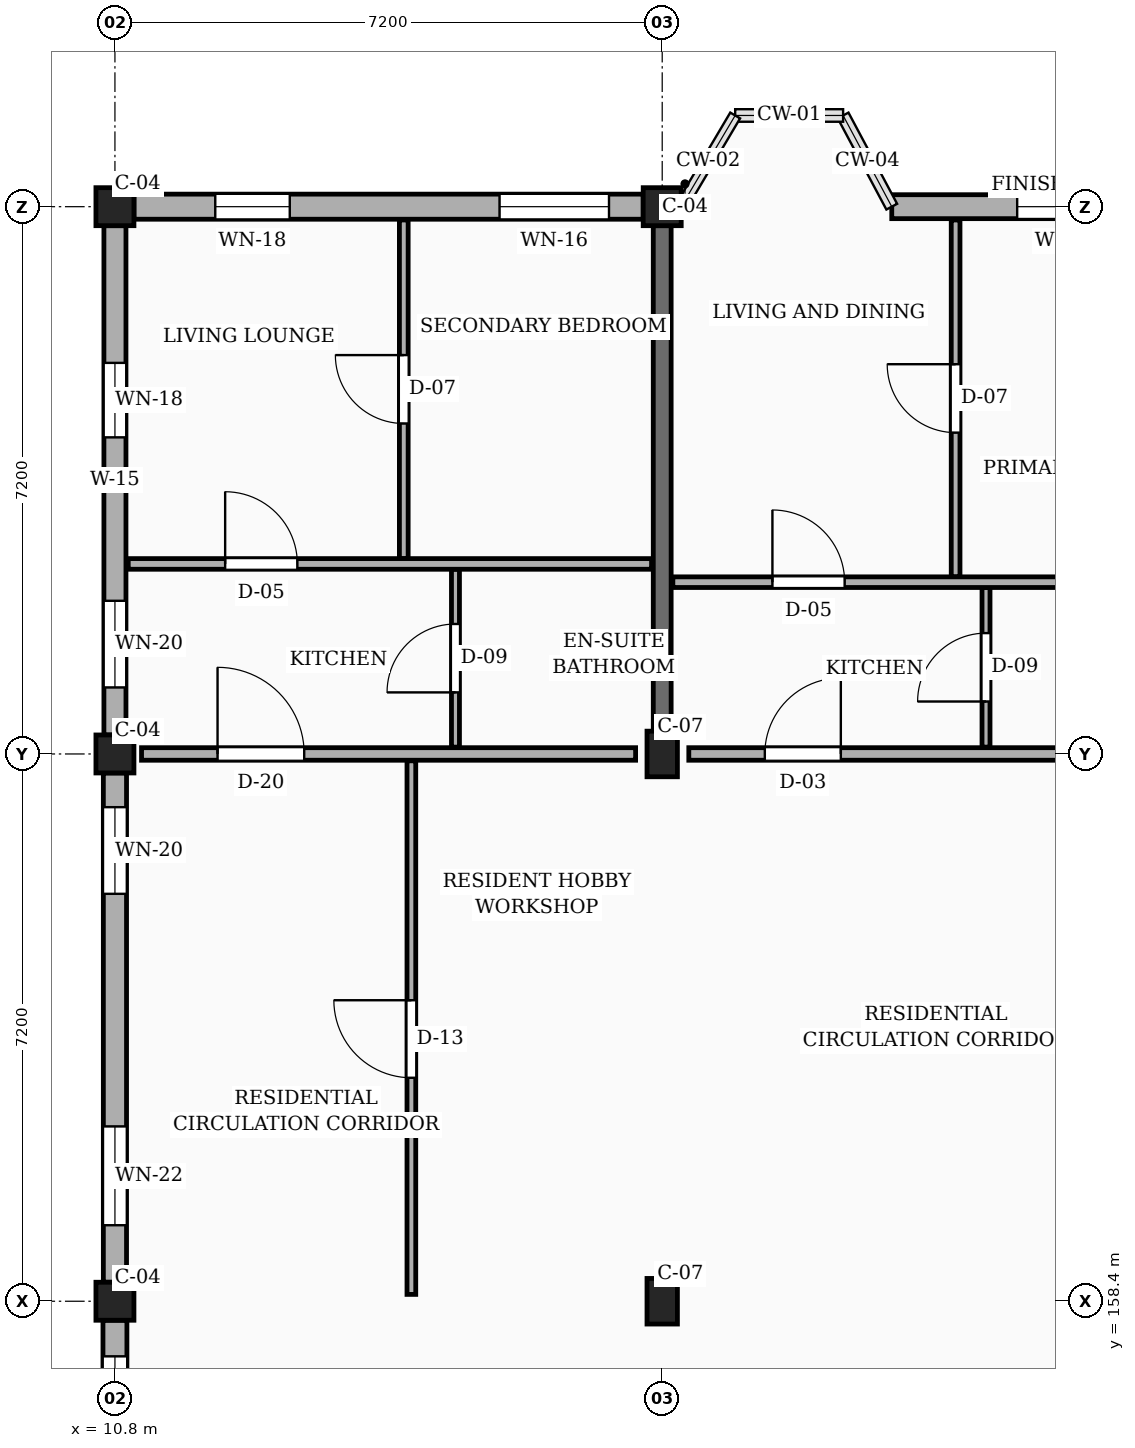
"""IFC4 building model, lengths in metres.
Left out: names, types, materials, properties, quantities, classifications, styles, units other than length and angle.
Written with IfcOpenShell. Run it as: python <this file> out.ifc"""

import sys

from ifc_helpers import new_model, si_unit, direction, frame, frame_2d, origin, origin_2d, place, context, subcontext, project, spatial, rectangle, extrude, element, fill, save


model = new_model("IFC4")
c1 = context("Model", 3, precision=1e-05, world=origin(), true_north=direction((0.0, 1.0)))
c2 = subcontext(c1, "Body", "Model", "MODEL_VIEW")
j1 = project(units=[si_unit("LENGTHUNIT", "METRE"), si_unit("PLANEANGLEUNIT", "RADIAN")], contexts=[c1])
p1 = place(None, origin())
s1 = spatial("IfcSite", under=j1, at=p1, CompositionType="ELEMENT")
p2 = place(p1, origin())
s2 = spatial("IfcBuilding", under=s1, at=p2, CompositionType="ELEMENT")
p3 = place(p2, frame((0.0, 0.0, 23.4)))
s3 = spatial("IfcBuildingStorey", under=s2, at=p3, CompositionType="ELEMENT", Elevation=23.4)
for number, where, z_axis, x_axis in (
    (1, (10.8, 158.4, 0.0), (0.0, 0.0, 1.0), (1.0, 0.0, 0.0)),
    (2, (10.8, 165.6, 0.0), (0.0, 0.0, 1.0), (1.0, 0.0, 0.0)),
    (3, (10.8, 172.8, 0.0), (0.0, 0.0, 1.0), (1.0, 0.0, 0.0)),
):
    element("IfcColumn", number, at=place(p3, frame(where, z_axis=z_axis, x_axis=x_axis)), inside=s3, PredefinedType="COLUMN", context=c2, shape_type="SweptSolid", body=[
        extrude(rectangle(XDim=0.5, YDim=0.5, at=origin_2d()), origin(), (0.0, 0.0, 1.0), 3.15),
    ])
for number, where, z_axis, x_axis in (
    (4, (18.0, 158.4, 0.0), (0.0, 0.0, 1.0), (1.0, 0.0, 0.0)),
    (5, (18.0, 165.6, 0.0), (0.0, 0.0, 1.0), (1.0, 0.0, 0.0)),
):
    element("IfcColumn", number, at=place(p3, frame(where, z_axis=z_axis, x_axis=x_axis)), inside=s3, PredefinedType="COLUMN", context=c2, shape_type="SweptSolid", body=[
        extrude(rectangle(XDim=0.4, YDim=0.6, at=origin_2d()), origin(), (0.0, 0.0, 1.0), 3.15),
    ])
p4 = place(p3, frame((18.0, 172.8, 0.0), z_axis=(0.0, 0.0, 1.0), x_axis=(1.0, 0.0, 0.0)))
e6 = element("IfcColumn", 6, at=p4, inside=s3, PredefinedType="COLUMN", context=c2, shape_type="SweptSolid", body=[
    extrude(rectangle(XDim=0.5, YDim=0.5, at=origin_2d()), origin(), (0.0, 0.0, 1.0), 3.15),
])
p5 = place(p3, frame((18.0, 165.9, 0.0), z_axis=(0.0, 0.0, 1.0), x_axis=(0.0, 1.0, 0.0)))
e7 = element("IfcWall", 7, at=p5, inside=s3, PredefinedType="SOLIDWALL", context=c2, shape_type="SweptSolid", body=[
    extrude(rectangle(XDim=6.65, YDim=0.235, at=frame_2d((3.325, 0.0))), origin(), (0.0, 0.0, 1.0), 2.185),
])
p6 = place(p3, frame((24.95, 172.8, 0.0), z_axis=(0.0, 0.0, 1.0), x_axis=(-1.0, 0.0, 0.0)))
e8 = element("IfcWall", 8, at=p6, inside=s3, PredefinedType="SOLIDWALL", context=c2, shape_type="SweptSolid", body=[
    extrude(rectangle(XDim=3.93, YDim=0.315, at=frame_2d((1.965, 0.0))), origin(), (0.0, 0.0, 1.0), 2.455),
])
p7 = place(p6, frame((0.92, 0.0, 0.78)))
e9 = element("IfcOpeningElement", 9, at=p7, cuts=e8, PredefinedType="OPENING", context=c2, shape_type="SweptSolid", body=[
    extrude(rectangle(XDim=1.36, YDim=1.26, at=frame_2d((0.68, 0.63))), frame((0.0, 0.167, 0.0), z_axis=(0.0, -1.0, 0.0), x_axis=(1.0, 0.0, 0.0)), (0.0, 0.0, 1.0), 0.335),
])
p8 = place(p3, frame((17.75, 172.8, 0.0), z_axis=(0.0, 0.0, 1.0), x_axis=(-1.0, 0.0, 0.0)))
e10 = element("IfcWall", 10, at=p8, inside=s3, PredefinedType="SOLIDWALL", context=c2, shape_type="SweptSolid", body=[
    extrude(rectangle(XDim=6.7, YDim=0.33, at=frame_2d((3.35, 0.0))), origin(), (0.0, 0.0, 1.0), 2.455),
])
p9 = place(p8, frame((0.45, 0.0, 0.78)))
e11 = element("IfcOpeningElement", 11, at=p9, cuts=e10, PredefinedType="OPENING", context=c2, shape_type="SweptSolid", body=[
    extrude(rectangle(XDim=1.44, YDim=1.26, at=frame_2d((0.72, 0.63))), frame((0.0, 0.175, 0.0), z_axis=(0.0, -1.0, 0.0), x_axis=(1.0, 0.0, 0.0)), (0.0, 0.0, 1.0), 0.35),
])
p10 = place(p8, frame((4.65, 0.0, 0.78)))
e12 = element("IfcOpeningElement", 12, at=p10, cuts=e10, PredefinedType="OPENING", context=c2, shape_type="SweptSolid", body=[
    extrude(rectangle(XDim=0.98, YDim=1.36, at=frame_2d((0.49, 0.68))), frame((0.0, 0.175, 0.0), z_axis=(0.0, -1.0, 0.0), x_axis=(1.0, 0.0, 0.0)), (0.0, 0.0, 1.0), 0.35),
])
p11 = place(p3, frame((10.8, 172.55, 0.0), z_axis=(0.0, 0.0, 1.0), x_axis=(0.0, -1.0, 0.0)))
e13 = element("IfcWall", 13, at=p11, inside=s3, PredefinedType="SOLIDWALL", context=c2, shape_type="SweptSolid", body=[
    extrude(rectangle(XDim=6.7, YDim=0.29, at=frame_2d((3.35, 0.0))), origin(), (0.0, 0.0, 1.0), 2.455),
])
p12 = place(p11, frame((1.805, 0.0, 0.78)))
e14 = element("IfcOpeningElement", 14, at=p12, cuts=e13, PredefinedType="OPENING", context=c2, shape_type="SweptSolid", body=[
    extrude(rectangle(XDim=0.98, YDim=1.36, at=frame_2d((0.49, 0.68))), frame((0.0, 0.155, 0.0), z_axis=(0.0, -1.0, 0.0), x_axis=(1.0, 0.0, 0.0)), (0.0, 0.0, 1.0), 0.31),
])
p13 = place(p11, frame((4.935, 0.0, 0.78)))
e15 = element("IfcOpeningElement", 15, at=p13, cuts=e13, PredefinedType="OPENING", context=c2, shape_type="SweptSolid", body=[
    extrude(rectangle(XDim=1.14, YDim=1.36, at=frame_2d((0.57, 0.68))), frame((0.0, 0.155, 0.0), z_axis=(0.0, -1.0, 0.0), x_axis=(1.0, 0.0, 0.0)), (0.0, 0.0, 1.0), 0.31),
])
p14 = place(p3, frame((10.8, 165.35, 0.0), z_axis=(0.0, 0.0, 1.0), x_axis=(0.0, -1.0, 0.0)))
e16 = element("IfcWall", 16, at=p14, inside=s3, PredefinedType="SOLIDWALL", context=c2, shape_type="SweptSolid", body=[
    extrude(rectangle(XDim=6.7, YDim=0.305, at=frame_2d((3.35, 0.0))), origin(), (0.0, 0.0, 1.0), 2.455),
])
p15 = place(p14, frame((0.45, 0.0, 0.78)))
e17 = element("IfcOpeningElement", 17, at=p15, cuts=e16, PredefinedType="OPENING", context=c2, shape_type="SweptSolid", body=[
    extrude(rectangle(XDim=1.14, YDim=1.36, at=frame_2d((0.57, 0.68))), frame((0.0, 0.163, 0.0), z_axis=(0.0, -1.0, 0.0), x_axis=(1.0, 0.0, 0.0)), (0.0, 0.0, 1.0), 0.325),
])
p16 = place(p14, frame((4.65, 0.0, 0.78)))
e18 = element("IfcOpeningElement", 18, at=p16, cuts=e16, PredefinedType="OPENING", context=c2, shape_type="SweptSolid", body=[
    extrude(rectangle(XDim=1.3, YDim=1.36, at=frame_2d((0.65, 0.68))), frame((0.0, 0.163, 0.0), z_axis=(0.0, -1.0, 0.0), x_axis=(1.0, 0.0, 0.0)), (0.0, 0.0, 1.0), 0.325),
])
p17 = place(p3, frame((10.8, 158.15, 0.0), z_axis=(0.0, 0.0, 1.0), x_axis=(0.0, -1.0, 0.0)))
e19 = element("IfcWall", 19, at=p17, inside=s3, PredefinedType="SOLIDWALL", context=c2, shape_type="SweptSolid", body=[
    extrude(rectangle(XDim=6.7, YDim=0.315, at=frame_2d((3.35, 0.0))), origin(), (0.0, 0.0, 1.0), 2.455),
])
p18 = place(p17, frame((0.475, 0.0, 0.78)))
e20 = element("IfcOpeningElement", 20, at=p18, cuts=e19, PredefinedType="OPENING", context=c2, shape_type="SweptSolid", body=[
    extrude(rectangle(XDim=1.04, YDim=1.26, at=frame_2d((0.52, 0.63))), frame((0.0, 0.167, 0.0), z_axis=(0.0, -1.0, 0.0), x_axis=(1.0, 0.0, 0.0)), (0.0, 0.0, 1.0), 0.335),
])
p19 = place(p17, frame((3.27, 0.0, 0.78)))
e21 = element("IfcOpeningElement", 21, at=p19, cuts=e19, PredefinedType="OPENING", context=c2, shape_type="SweptSolid", body=[
    extrude(rectangle(XDim=1.46, YDim=1.36, at=frame_2d((0.73, 0.68))), frame((0.0, 0.167, 0.0), z_axis=(0.0, -1.0, 0.0), x_axis=(1.0, 0.0, 0.0)), (0.0, 0.0, 1.0), 0.335),
])
p20 = place(p3, frame((11.15, 165.6, 0.0), z_axis=(0.0, 0.0, 1.0), x_axis=(1.0, 0.0, 0.0)))
e22 = element("IfcWall", 22, at=p20, inside=s3, PredefinedType="PARTITIONING", context=c2, shape_type="SweptSolid", body=[
    extrude(rectangle(XDim=6.5, YDim=0.165, at=frame_2d((3.25, 0.0))), origin(), (0.0, 0.0, 1.0), 2.32),
])
p21 = place(p20, frame((1.0, 0.0, 0.0)))
e23 = element("IfcOpeningElement", 23, at=p21, cuts=e22, PredefinedType="OPENING", context=c2, shape_type="SweptSolid", body=[
    extrude(rectangle(XDim=1.14, YDim=2.18, at=frame_2d((0.57, 1.09))), frame((0.0, 0.093, 0.0), z_axis=(0.0, -1.0, 0.0), x_axis=(1.0, 0.0, 0.0)), (0.0, 0.0, 1.0), 0.185),
])
p22 = place(p3, frame((18.35, 165.6, 0.0), z_axis=(0.0, 0.0, 1.0), x_axis=(1.0, 0.0, 0.0)))
e24 = element("IfcWall", 24, at=p22, inside=s3, PredefinedType="PARTITIONING", context=c2, shape_type="SweptSolid", body=[
    extrude(rectangle(XDim=6.5, YDim=0.165, at=frame_2d((3.25, 0.0))), origin(), (0.0, 0.0, 1.0), 2.32),
])
p23 = place(p22, frame((1.0, 0.0, 0.0)))
e25 = element("IfcOpeningElement", 25, at=p23, cuts=e24, PredefinedType="OPENING", context=c2, shape_type="SweptSolid", body=[
    extrude(rectangle(XDim=1.0, YDim=2.15, at=frame_2d((0.5, 1.075))), frame((0.0, 0.093, 0.0), z_axis=(0.0, -1.0, 0.0), x_axis=(1.0, 0.0, 0.0)), (0.0, 0.0, 1.0), 0.185),
])
p24 = place(p3, frame((14.7, 158.49, 0.0), z_axis=(0.0, 0.0, 1.0), x_axis=(0.0, 1.0, 0.0)))
e26 = element("IfcWall", 26, at=p24, inside=s3, PredefinedType="PARTITIONING", context=c2, shape_type="SweptSolid", body=[
    extrude(rectangle(XDim=7.02, YDim=0.115, at=frame_2d((3.51, 0.0))), origin(), (0.0, 0.0, 1.0), 2.32),
])
p25 = place(p24, frame((2.85, 0.0, 0.0)))
e27 = element("IfcOpeningElement", 27, at=p25, cuts=e26, PredefinedType="OPENING", context=c2, shape_type="SweptSolid", body=[
    extrude(rectangle(XDim=1.02, YDim=2.15, at=frame_2d((0.51, 1.075))), frame((0.0, 0.067, 0.0), z_axis=(0.0, -1.0, 0.0), x_axis=(1.0, 0.0, 0.0)), (0.0, 0.0, 1.0), 0.135),
])
p26 = place(p3, frame((14.6, 168.17, 0.0), z_axis=(0.0, 0.0, 1.0), x_axis=(0.0, 1.0, 0.0)))
e28 = element("IfcWall", 28, at=p26, inside=s3, PredefinedType="PARTITIONING", context=c2, shape_type="SweptSolid", body=[
    extrude(rectangle(XDim=4.455, YDim=0.115, at=frame_2d((2.228, 0.0))), origin(), (0.0, 0.0, 1.0), 2.32),
])
p27 = place(p26, frame((1.778, 0.0, 0.0)))
e29 = element("IfcOpeningElement", 29, at=p27, cuts=e28, PredefinedType="OPENING", context=c2, shape_type="SweptSolid", body=[
    extrude(rectangle(XDim=0.9, YDim=2.1, at=frame_2d((0.45, 1.05))), frame((0.0, 0.067, 0.0), z_axis=(0.0, -1.0, 0.0), x_axis=(1.0, 0.0, 0.0)), (0.0, 0.0, 1.0), 0.135),
])
p28 = place(p3, frame((15.28, 165.69, 0.0), z_axis=(0.0, 0.0, 1.0), x_axis=(0.0, 1.0, 0.0)))
e30 = element("IfcWall", 30, at=p28, inside=s3, PredefinedType="PARTITIONING", context=c2, shape_type="SweptSolid", body=[
    extrude(rectangle(XDim=2.34, YDim=0.105, at=frame_2d((1.17, 0.0))), origin(), (0.0, 0.0, 1.0), 2.32),
])
p29 = place(p28, frame((0.72, 0.0, 0.0)))
e31 = element("IfcOpeningElement", 31, at=p29, cuts=e30, PredefinedType="OPENING", context=c2, shape_type="SweptSolid", body=[
    extrude(rectangle(XDim=0.9, YDim=2.05, at=frame_2d((0.45, 1.025))), frame((0.0, 0.062, 0.0), z_axis=(0.0, -1.0, 0.0), x_axis=(1.0, 0.0, 0.0)), (0.0, 0.0, 1.0), 0.125),
])
p30 = place(p3, frame((10.975, 168.1, 0.0), z_axis=(0.0, 0.0, 1.0), x_axis=(1.0, 0.0, 0.0)))
e32 = element("IfcWall", 32, at=p30, inside=s3, PredefinedType="PARTITIONING", context=c2, shape_type="SweptSolid", body=[
    extrude(rectangle(XDim=6.885, YDim=0.14, at=frame_2d((3.442, 0.0))), origin(), (0.0, 0.0, 1.0), 2.32),
])
p31 = place(p30, frame((1.275, 0.0, 0.0)))
e33 = element("IfcOpeningElement", 33, at=p31, cuts=e32, PredefinedType="OPENING", context=c2, shape_type="SweptSolid", body=[
    extrude(rectangle(XDim=0.95, YDim=2.1, at=frame_2d((0.475, 1.05))), frame((0.0, 0.08, 0.0), z_axis=(0.0, -1.0, 0.0), x_axis=(1.0, 0.0, 0.0)), (0.0, 0.0, 1.0), 0.16),
])
p32 = place(p3, frame((21.86, 167.93, 0.0), z_axis=(0.0, 0.0, 1.0), x_axis=(0.0, 1.0, 0.0)))
e34 = element("IfcWall", 34, at=p32, inside=s3, PredefinedType="PARTITIONING", context=c2, shape_type="SweptSolid", body=[
    extrude(rectangle(XDim=4.695, YDim=0.115, at=frame_2d((2.348, 0.0))), origin(), (0.0, 0.0, 1.0), 2.32),
])
p33 = place(p32, frame((1.897, 0.0, 0.0)))
e35 = element("IfcOpeningElement", 35, at=p33, cuts=e34, PredefinedType="OPENING", context=c2, shape_type="SweptSolid", body=[
    extrude(rectangle(XDim=0.9, YDim=2.1, at=frame_2d((0.45, 1.05))), frame((0.0, 0.067, 0.0), z_axis=(0.0, -1.0, 0.0), x_axis=(1.0, 0.0, 0.0)), (0.0, 0.0, 1.0), 0.135),
])
p34 = place(p3, frame((22.26, 165.69, 0.0), z_axis=(0.0, 0.0, 1.0), x_axis=(0.0, 1.0, 0.0)))
e36 = element("IfcWall", 36, at=p34, inside=s3, PredefinedType="PARTITIONING", context=c2, shape_type="SweptSolid", body=[
    extrude(rectangle(XDim=2.1, YDim=0.105, at=frame_2d((1.05, 0.0))), origin(), (0.0, 0.0, 1.0), 2.32),
])
p35 = place(p34, frame((0.6, 0.0, 0.0)))
e37 = element("IfcOpeningElement", 37, at=p35, cuts=e36, PredefinedType="OPENING", context=c2, shape_type="SweptSolid", body=[
    extrude(rectangle(XDim=0.9, YDim=2.05, at=frame_2d((0.45, 1.025))), frame((0.0, 0.062, 0.0), z_axis=(0.0, -1.0, 0.0), x_axis=(1.0, 0.0, 0.0)), (0.0, 0.0, 1.0), 0.125),
])
p36 = place(p3, frame((18.14, 167.86, 0.0), z_axis=(0.0, 0.0, 1.0), x_axis=(1.0, 0.0, 0.0)))
e38 = element("IfcWall", 38, at=p36, inside=s3, PredefinedType="PARTITIONING", context=c2, shape_type="SweptSolid", body=[
    extrude(rectangle(XDim=6.92, YDim=0.14, at=frame_2d((3.46, 0.0))), origin(), (0.0, 0.0, 1.0), 2.32),
])
p37 = place(p36, frame((1.31, 0.0, 0.0)))
e39 = element("IfcOpeningElement", 39, at=p37, cuts=e38, PredefinedType="OPENING", context=c2, shape_type="SweptSolid", body=[
    extrude(rectangle(XDim=0.95, YDim=2.1, at=frame_2d((0.475, 1.05))), frame((0.0, 0.08, 0.0), z_axis=(0.0, -1.0, 0.0), x_axis=(1.0, 0.0, 0.0)), (0.0, 0.0, 1.0), 0.16),
])
p38 = place(p7, origin())
e40 = element("IfcWindow", 40, at=p38, inside=s3, PartitioningType="SINGLE_PANEL", PredefinedType="WINDOW", context=c2, shape_type="SweptSolid", body=[
    extrude(rectangle(XDim=1.36, YDim=1.26, at=frame_2d((0.68, 0.63))), frame((0.0, 0.03, 0.0), z_axis=(0.0, -1.0, 0.0), x_axis=(1.0, 0.0, 0.0)), (0.0, 0.0, 1.0), 0.06),
])
fill(e9, e40)
p39 = place(p9, origin())
e41 = element("IfcWindow", 41, at=p39, inside=s3, PartitioningType="SINGLE_PANEL", PredefinedType="WINDOW", context=c2, shape_type="SweptSolid", body=[
    extrude(rectangle(XDim=1.44, YDim=1.26, at=frame_2d((0.72, 0.63))), frame((0.0, 0.03, 0.0), z_axis=(0.0, -1.0, 0.0), x_axis=(1.0, 0.0, 0.0)), (0.0, 0.0, 1.0), 0.06),
])
fill(e11, e41)
p40 = place(p10, origin())
e42 = element("IfcWindow", 42, at=p40, inside=s3, PartitioningType="SINGLE_PANEL", PredefinedType="WINDOW", context=c2, shape_type="SweptSolid", body=[
    extrude(rectangle(XDim=0.98, YDim=1.36, at=frame_2d((0.49, 0.68))), frame((0.0, 0.03, 0.0), z_axis=(0.0, -1.0, 0.0), x_axis=(1.0, 0.0, 0.0)), (0.0, 0.0, 1.0), 0.06),
])
fill(e12, e42)
p41 = place(p12, origin())
e43 = element("IfcWindow", 43, at=p41, inside=s3, PartitioningType="SINGLE_PANEL", PredefinedType="WINDOW", context=c2, shape_type="SweptSolid", body=[
    extrude(rectangle(XDim=0.98, YDim=1.36, at=frame_2d((0.49, 0.68))), frame((0.0, 0.03, 0.0), z_axis=(0.0, -1.0, 0.0), x_axis=(1.0, 0.0, 0.0)), (0.0, 0.0, 1.0), 0.06),
])
fill(e14, e43)
p42 = place(p13, origin())
e44 = element("IfcWindow", 44, at=p42, inside=s3, PartitioningType="SINGLE_PANEL", PredefinedType="WINDOW", context=c2, shape_type="SweptSolid", body=[
    extrude(rectangle(XDim=1.14, YDim=1.36, at=frame_2d((0.57, 0.68))), frame((0.0, 0.03, 0.0), z_axis=(0.0, -1.0, 0.0), x_axis=(1.0, 0.0, 0.0)), (0.0, 0.0, 1.0), 0.06),
])
fill(e15, e44)
p43 = place(p15, origin())
e45 = element("IfcWindow", 45, at=p43, inside=s3, PartitioningType="SINGLE_PANEL", PredefinedType="WINDOW", context=c2, shape_type="SweptSolid", body=[
    extrude(rectangle(XDim=1.14, YDim=1.36, at=frame_2d((0.57, 0.68))), frame((0.0, 0.03, 0.0), z_axis=(0.0, -1.0, 0.0), x_axis=(1.0, 0.0, 0.0)), (0.0, 0.0, 1.0), 0.06),
])
fill(e17, e45)
p44 = place(p16, origin())
e46 = element("IfcWindow", 46, at=p44, inside=s3, PartitioningType="SINGLE_PANEL", PredefinedType="WINDOW", context=c2, shape_type="SweptSolid", body=[
    extrude(rectangle(XDim=1.3, YDim=1.36, at=frame_2d((0.65, 0.68))), frame((0.0, 0.03, 0.0), z_axis=(0.0, -1.0, 0.0), x_axis=(1.0, 0.0, 0.0)), (0.0, 0.0, 1.0), 0.06),
])
fill(e18, e46)
p45 = place(p18, origin())
e47 = element("IfcWindow", 47, at=p45, inside=s3, PartitioningType="SINGLE_PANEL", PredefinedType="WINDOW", context=c2, shape_type="SweptSolid", body=[
    extrude(rectangle(XDim=1.04, YDim=1.26, at=frame_2d((0.52, 0.63))), frame((0.0, 0.03, 0.0), z_axis=(0.0, -1.0, 0.0), x_axis=(1.0, 0.0, 0.0)), (0.0, 0.0, 1.0), 0.06),
])
fill(e20, e47)
p46 = place(p21, origin())
e48 = element("IfcDoor", 48, at=p46, inside=s3, OperationType="SINGLE_SWING_LEFT", PredefinedType="DOOR", context=c2, shape_type="SweptSolid", body=[
    extrude(rectangle(XDim=1.14, YDim=2.18, at=frame_2d((0.57, 1.09))), frame((0.0, 0.025, 0.0), z_axis=(0.0, -1.0, 0.0), x_axis=(1.0, 0.0, 0.0)), (0.0, 0.0, 1.0), 0.05),
])
fill(e23, e48)
p47 = place(p23, origin())
e49 = element("IfcDoor", 49, at=p47, inside=s3, OperationType="SINGLE_SWING_RIGHT", PredefinedType="DOOR", context=c2, shape_type="SweptSolid", body=[
    extrude(rectangle(XDim=1.0, YDim=2.15, at=frame_2d((0.5, 1.075))), frame((0.0, 0.025, 0.0), z_axis=(0.0, -1.0, 0.0), x_axis=(1.0, 0.0, 0.0)), (0.0, 0.0, 1.0), 0.05),
])
fill(e25, e49)
p48 = place(p25, origin())
e50 = element("IfcDoor", 50, at=p48, inside=s3, OperationType="SINGLE_SWING_RIGHT", PredefinedType="DOOR", context=c2, shape_type="SweptSolid", body=[
    extrude(rectangle(XDim=1.02, YDim=2.15, at=frame_2d((0.51, 1.075))), frame((0.0, 0.025, 0.0), z_axis=(0.0, -1.0, 0.0), x_axis=(1.0, 0.0, 0.0)), (0.0, 0.0, 1.0), 0.05),
])
fill(e27, e50)
p49 = place(p27, origin())
e51 = element("IfcDoor", 51, at=p49, inside=s3, OperationType="SINGLE_SWING_RIGHT", PredefinedType="DOOR", context=c2, shape_type="SweptSolid", body=[
    extrude(rectangle(XDim=0.9, YDim=2.1, at=frame_2d((0.45, 1.05))), frame((0.0, 0.025, 0.0), z_axis=(0.0, -1.0, 0.0), x_axis=(1.0, 0.0, 0.0)), (0.0, 0.0, 1.0), 0.05),
])
fill(e29, e51)
p50 = place(p29, origin())
e52 = element("IfcDoor", 52, at=p50, inside=s3, OperationType="SINGLE_SWING_LEFT", PredefinedType="DOOR", context=c2, shape_type="SweptSolid", body=[
    extrude(rectangle(XDim=0.9, YDim=2.05, at=frame_2d((0.45, 1.025))), frame((0.0, 0.025, 0.0), z_axis=(0.0, -1.0, 0.0), x_axis=(1.0, 0.0, 0.0)), (0.0, 0.0, 1.0), 0.05),
])
fill(e31, e52)
p51 = place(p31, origin())
e53 = element("IfcDoor", 53, at=p51, inside=s3, OperationType="SINGLE_SWING_LEFT", PredefinedType="DOOR", context=c2, shape_type="SweptSolid", body=[
    extrude(rectangle(XDim=0.95, YDim=2.1, at=frame_2d((0.475, 1.05))), frame((0.0, 0.025, 0.0), z_axis=(0.0, -1.0, 0.0), x_axis=(1.0, 0.0, 0.0)), (0.0, 0.0, 1.0), 0.05),
])
fill(e33, e53)
p52 = place(p33, origin())
e54 = element("IfcDoor", 54, at=p52, inside=s3, OperationType="SINGLE_SWING_RIGHT", PredefinedType="DOOR", context=c2, shape_type="SweptSolid", body=[
    extrude(rectangle(XDim=0.9, YDim=2.1, at=frame_2d((0.45, 1.05))), frame((0.0, 0.025, 0.0), z_axis=(0.0, -1.0, 0.0), x_axis=(1.0, 0.0, 0.0)), (0.0, 0.0, 1.0), 0.05),
])
fill(e35, e54)
p53 = place(p35, origin())
e55 = element("IfcDoor", 55, at=p53, inside=s3, OperationType="SINGLE_SWING_LEFT", PredefinedType="DOOR", context=c2, shape_type="SweptSolid", body=[
    extrude(rectangle(XDim=0.9, YDim=2.05, at=frame_2d((0.45, 1.025))), frame((0.0, 0.025, 0.0), z_axis=(0.0, -1.0, 0.0), x_axis=(1.0, 0.0, 0.0)), (0.0, 0.0, 1.0), 0.05),
])
fill(e37, e55)
p54 = place(p37, origin())
e56 = element("IfcDoor", 56, at=p54, inside=s3, OperationType="SINGLE_SWING_LEFT", PredefinedType="DOOR", context=c2, shape_type="SweptSolid", body=[
    extrude(rectangle(XDim=0.95, YDim=2.1, at=frame_2d((0.475, 1.05))), frame((0.0, 0.025, 0.0), z_axis=(0.0, -1.0, 0.0), x_axis=(1.0, 0.0, 0.0)), (0.0, 0.0, 1.0), 0.05),
])
fill(e39, e56)
save(model, sys.argv[1])
